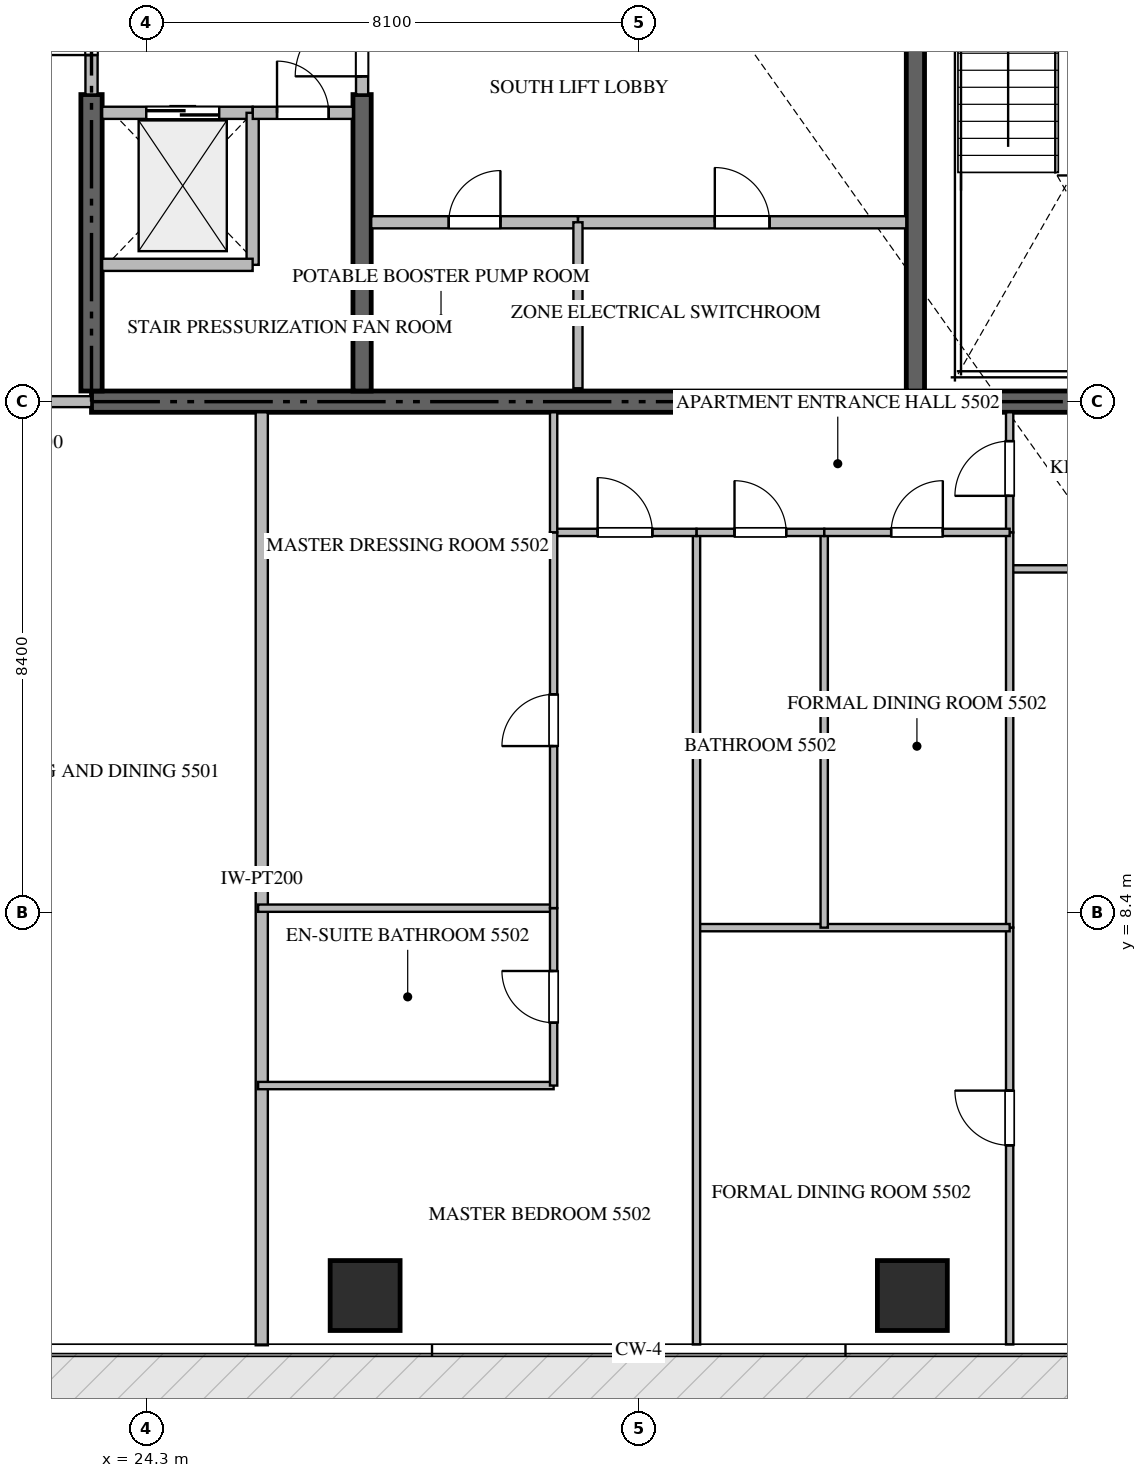
"""IFC4 building model, lengths in metres.
Left out: names, types, materials, properties, quantities, classifications, styles, units other than length and angle.
Written with IfcOpenShell. Run it as: python <this file> out.ifc"""

import sys

from ifc_helpers import new_model, si_unit, direction, frame, frame_2d, origin, origin_2d, place, context, subcontext, project, spatial, rectangle, extrude, source, transform, mapped, element, fill, save


model = new_model("IFC4")
c1 = context("Model", 3, precision=1e-05, world=origin(), true_north=direction((0.0, 1.0)))
c2 = subcontext(c1, "Body", "Model", "MODEL_VIEW")
j1 = project(units=[si_unit("LENGTHUNIT", "METRE"), si_unit("PLANEANGLEUNIT", "RADIAN")], contexts=[c1])
p1 = place(None, origin())
s1 = spatial("IfcSite", under=j1, at=p1, CompositionType="ELEMENT")
p2 = place(p1, origin())
s2 = spatial("IfcBuilding", under=s1, at=p2, CompositionType="ELEMENT")
p3 = place(p2, frame((0.0, 0.0, 222.0)))
s3 = spatial("IfcBuildingStorey", under=s2, at=p3, CompositionType="ELEMENT", Elevation=222.0)
p4 = place(p3, frame((23.4, 16.8, -0.26), z_axis=(0.0, 0.0, 1.0), x_axis=(1.0, 0.0, 0.0)))
e1 = element("IfcWall", 1, at=p4, inside=s3, PredefinedType="SHEAR", context=c2, shape_type="SweptSolid", body=[
    extrude(rectangle(XDim=18.0, YDim=0.35, at=frame_2d((9.0, 0.0))), origin(), (0.0, 0.0, 1.0), 3.848),
])
p5 = place(p3, frame((23.4, 16.975, -0.26), z_axis=(0.0, 0.0, 1.0), x_axis=(0.0, 1.0, 0.0)))
e2 = element("IfcWall", 2, at=p5, inside=s3, PredefinedType="SHEAR", context=c2, shape_type="SweptSolid", body=[
    extrude(rectangle(XDim=4.875, YDim=0.35, at=frame_2d((2.438, 0.0))), origin(), (0.0, 0.0, 1.0), 3.848),
])
p6 = place(p3, frame((27.85, 16.975, -0.26), z_axis=(0.0, 0.0, 1.0), x_axis=(0.0, 1.0, 0.0)))
e3 = element("IfcWall", 3, at=p6, inside=s3, PredefinedType="SHEAR", context=c2, shape_type="SweptSolid", body=[
    extrude(rectangle(XDim=4.875, YDim=0.3, at=frame_2d((2.438, 0.0))), origin(), (0.0, 0.0, 1.0), 3.848),
])
p7 = place(p3, frame((36.95, 16.975, -0.26), z_axis=(0.0, 0.0, 1.0), x_axis=(0.0, 1.0, 0.0)))
e4 = element("IfcWall", 4, at=p7, inside=s3, PredefinedType="SHEAR", context=c2, shape_type="SweptSolid", body=[
    extrude(rectangle(XDim=8.375, YDim=0.3, at=frame_2d((4.188, 0.0))), origin(), (0.0, 0.0, 1.0), 3.848),
])
m1 = source(origin(), c2, "Body", "SweptSolid", [
    extrude(rectangle(XDim=1.15, YDim=1.15, at=origin_2d()), origin(), (0.0, 0.0, 1.0), 3.85),
])
for number, where, z_axis, x_axis in (
    (5, (27.9, 2.1, -0.26), (0.0, 0.0, 1.0), (1.0, 0.0, 0.0)),
    (6, (36.9, 2.1, -0.26), (0.0, 0.0, 1.0), (1.0, 0.0, 0.0)),
):
    element("IfcColumn", number, at=place(p3, frame(where, z_axis=z_axis, x_axis=x_axis)), inside=s3, PredefinedType="COLUMN", context=c2, shape_type="MappedRepresentation", body=[
        mapped(m1, transform((0.0, 0.0, 0.0), scale=1.0)),
    ])
p8 = place(p3, frame((23.575, 21.55, 0.0), z_axis=(0.0, 0.0, 1.0), x_axis=(1.0, 0.0, 0.0)))
e7 = element("IfcWall", 7, at=p8, inside=s3, PredefinedType="STANDARD", context=c2, shape_type="SweptSolid", body=[
    extrude(rectangle(XDim=2.475, YDim=0.2, at=frame_2d((1.238, 0.0))), origin(), (0.0, 0.0, 1.0), 3.59),
])
p9 = place(p8, frame((0.725, 0.0, 0.0)))
e8 = element("IfcOpeningElement", 8, at=p9, cuts=e7, PredefinedType="OPENING", context=c2, shape_type="SweptSolid", body=[
    extrude(rectangle(XDim=1.2, YDim=2.2, at=frame_2d((0.6, 1.1))), frame((0.0, 0.11, 0.0), z_axis=(0.0, -1.0, 0.0), x_axis=(1.0, 0.0, 0.0)), (0.0, 0.0, 1.0), 0.22),
])
p10 = place(p3, frame((26.05, 19.05, 0.0), z_axis=(0.0, 0.0, 1.0), x_axis=(0.0, 1.0, 0.0)))
e9 = element("IfcWall", 9, at=p10, inside=s3, PredefinedType="STANDARD", context=c2, shape_type="SweptSolid", body=[
    extrude(rectangle(XDim=2.5, YDim=0.2, at=frame_2d((1.25, 0.0))), origin(), (0.0, 0.0, 1.0), 3.59),
])
p11 = place(p3, frame((23.575, 19.05, 0.0), z_axis=(0.0, 0.0, 1.0), x_axis=(1.0, 0.0, 0.0)))
e10 = element("IfcWall", 10, at=p11, inside=s3, PredefinedType="STANDARD", context=c2, shape_type="SweptSolid", body=[
    extrude(rectangle(XDim=2.475, YDim=0.2, at=frame_2d((1.238, 0.0))), origin(), (0.0, 0.0, 1.0), 3.59),
])
p12 = place(p3, frame((26.052, 21.55, 0.0), z_axis=(0.0, 0.0, 1.0), x_axis=(1.0, 0.0, 0.0)))
e11 = element("IfcWall", 11, at=p12, inside=s3, PredefinedType="STANDARD", context=c2, shape_type="SweptSolid", body=[
    extrude(rectangle(XDim=1.648, YDim=0.2, at=frame_2d((0.824, 0.0))), origin(), (0.0, 0.0, 1.0), 3.59),
])
p13 = place(p12, frame((0.399, 0.0, 0.0)))
e12 = element("IfcOpeningElement", 12, at=p13, cuts=e11, PredefinedType="OPENING", context=c2, shape_type="SweptSolid", body=[
    extrude(rectangle(XDim=0.85, YDim=2.1, at=frame_2d((0.425, 1.05))), frame((0.0, 0.11, 0.0), z_axis=(0.0, -1.0, 0.0), x_axis=(1.0, 0.0, 0.0)), (0.0, 0.0, 1.0), 0.22),
])
p14 = place(p3, frame((23.4, 21.852, 0.0), z_axis=(0.0, 0.0, 1.0), x_axis=(0.0, 1.0, 0.0)))
e13 = element("IfcWall", 13, at=p14, inside=s3, PredefinedType="STANDARD", context=c2, shape_type="SweptSolid", body=[
    extrude(rectangle(XDim=2.396, YDim=0.2, at=frame_2d((1.198, 0.0))), origin(), (0.0, 0.0, 1.0), 3.59),
])
p15 = place(p14, frame((0.648, 0.0, 0.0)))
e14 = element("IfcOpeningElement", 14, at=p15, cuts=e13, PredefinedType="OPENING", context=c2, shape_type="SweptSolid", body=[
    extrude(rectangle(XDim=1.1, YDim=2.15, at=frame_2d((0.55, 1.075))), frame((0.0, 0.11, 0.0), z_axis=(0.0, -1.0, 0.0), x_axis=(1.0, 0.0, 0.0)), (0.0, 0.0, 1.0), 0.22),
])
p16 = place(p3, frame((27.85, 21.852, 0.0), z_axis=(0.0, 0.0, 1.0), x_axis=(0.0, 1.0, 0.0)))
e15 = element("IfcWall", 15, at=p16, inside=s3, PredefinedType="STANDARD", context=c2, shape_type="SweptSolid", body=[
    extrude(rectangle(XDim=1.696, YDim=0.2, at=frame_2d((0.848, 0.0))), origin(), (0.0, 0.0, 1.0), 3.59),
])
p17 = place(p16, frame((0.298, 0.0, 0.0)))
e16 = element("IfcOpeningElement", 16, at=p17, cuts=e15, PredefinedType="OPENING", context=c2, shape_type="SweptSolid", body=[
    extrude(rectangle(XDim=1.1, YDim=2.15, at=frame_2d((0.55, 1.075))), frame((0.0, 0.11, 0.0), z_axis=(0.0, -1.0, 0.0), x_axis=(1.0, 0.0, 0.0)), (0.0, 0.0, 1.0), 0.22),
])
p18 = place(p3, frame((28.0, 19.75, 0.0), z_axis=(0.0, 0.0, 1.0), x_axis=(1.0, 0.0, 0.0)))
e17 = element("IfcWall", 17, at=p18, inside=s3, PredefinedType="STANDARD", context=c2, shape_type="SweptSolid", body=[
    extrude(rectangle(XDim=3.4, YDim=0.2, at=frame_2d((1.7, 0.0))), origin(), (0.0, 0.0, 1.0), 3.59),
])
p19 = place(p18, frame((1.275, 0.0, 0.0)))
e18 = element("IfcOpeningElement", 18, at=p19, cuts=e17, PredefinedType="OPENING", context=c2, shape_type="SweptSolid", body=[
    extrude(rectangle(XDim=0.85, YDim=2.1, at=frame_2d((0.425, 1.05))), frame((0.0, 0.11, 0.0), z_axis=(0.0, -1.0, 0.0), x_axis=(1.0, 0.0, 0.0)), (0.0, 0.0, 1.0), 0.22),
])
p20 = place(p3, frame((31.402, 19.75, 0.0), z_axis=(0.0, 0.0, 1.0), x_axis=(1.0, 0.0, 0.0)))
e19 = element("IfcWall", 19, at=p20, inside=s3, PredefinedType="STANDARD", context=c2, shape_type="SweptSolid", body=[
    extrude(rectangle(XDim=5.398, YDim=0.2, at=frame_2d((2.699, 0.0))), origin(), (0.0, 0.0, 1.0), 3.59),
])
p21 = place(p20, frame((2.249, 0.0, 0.0)))
e20 = element("IfcOpeningElement", 20, at=p21, cuts=e19, PredefinedType="OPENING", context=c2, shape_type="SweptSolid", body=[
    extrude(rectangle(XDim=0.9, YDim=2.1, at=frame_2d((0.45, 1.05))), frame((0.0, 0.11, 0.0), z_axis=(0.0, -1.0, 0.0), x_axis=(1.0, 0.0, 0.0)), (0.0, 0.0, 1.0), 0.22),
])
p22 = place(p3, frame((31.4, 17.02, 0.0), z_axis=(0.0, 0.0, 1.0), x_axis=(0.0, 1.0, 0.0)))
e21 = element("IfcWall", 21, at=p22, inside=s3, PredefinedType="PARTITIONING", context=c2, shape_type="SweptSolid", body=[
    extrude(rectangle(XDim=2.73, YDim=0.15, at=frame_2d((1.365, 0.0))), origin(), (0.0, 0.0, 1.0), 3.59),
])
p23 = place(p3, frame((26.2, 1.282, 0.0), z_axis=(0.0, 0.0, 1.0), x_axis=(0.0, 1.0, 0.0)))
e22 = element("IfcWall", 22, at=p23, inside=s3, PredefinedType="PARTITIONING", context=c2, shape_type="SweptSolid", body=[
    extrude(rectangle(XDim=15.343, YDim=0.2, at=frame_2d((7.671, 0.0))), origin(), (0.0, 0.0, 1.0), 3.59),
])
p24 = place(p3, frame((20.902, 16.8, 0.0), z_axis=(0.0, 0.0, 1.0), x_axis=(1.0, 0.0, 0.0)))
e23 = element("IfcWall", 23, at=p24, inside=s3, PredefinedType="PARTITIONING", context=c2, shape_type="SweptSolid", body=[
    extrude(rectangle(XDim=2.496, YDim=0.18, at=frame_2d((1.248, 0.0))), origin(), (0.0, 0.0, 1.0), 3.59),
])
p25 = place(p24, frame((0.748, 0.0, 0.0)))
e24 = element("IfcOpeningElement", 24, at=p25, cuts=e23, PredefinedType="OPENING", context=c2, shape_type="SweptSolid", body=[
    extrude(rectangle(XDim=1.0, YDim=2.15, at=frame_2d((0.5, 1.075))), frame((0.0, 0.1, 0.0), z_axis=(0.0, -1.0, 0.0), x_axis=(1.0, 0.0, 0.0)), (0.0, 0.0, 1.0), 0.2),
])
p26 = place(p3, frame((38.5, 14.05, 0.0), z_axis=(0.0, 0.0, 1.0), x_axis=(1.0, 0.0, 0.0)))
e25 = element("IfcWall", 25, at=p26, inside=s3, PredefinedType="PARTITIONING", context=c2, shape_type="SweptSolid", body=[
    extrude(rectangle(XDim=2.85, YDim=0.12, at=frame_2d((1.425, 0.0))), origin(), (0.0, 0.0, 1.0), 3.59),
])
p27 = place(p26, frame((1.0, 0.0, 0.0)))
e26 = element("IfcOpeningElement", 26, at=p27, cuts=e25, PredefinedType="OPENING", context=c2, shape_type="SweptSolid", body=[
    extrude(rectangle(XDim=0.85, YDim=2.1, at=frame_2d((0.425, 1.05))), frame((0.0, 0.07, 0.0), z_axis=(0.0, -1.0, 0.0), x_axis=(1.0, 0.0, 0.0)), (0.0, 0.0, 1.0), 0.14),
])
p28 = place(p3, frame((38.5, 14.65, 0.0), z_axis=(0.0, 0.0, 1.0), x_axis=(0.0, 1.0, 0.0)))
e27 = element("IfcWall", 27, at=p28, inside=s3, PredefinedType="PARTITIONING", context=c2, shape_type="SweptSolid", body=[
    extrude(rectangle(XDim=1.975, YDim=0.12, at=frame_2d((0.988, 0.0))), origin(), (0.0, 0.0, 1.0), 3.59),
])
p29 = place(p28, frame((0.601, 0.0, 0.0)))
e28 = element("IfcOpeningElement", 28, at=p29, cuts=e27, PredefinedType="OPENING", context=c2, shape_type="SweptSolid", body=[
    extrude(rectangle(XDim=0.9, YDim=2.1, at=frame_2d((0.45, 1.05))), frame((0.0, 0.07, 0.0), z_axis=(0.0, -1.0, 0.0), x_axis=(1.0, 0.0, 0.0)), (0.0, 0.0, 1.0), 0.14),
])
p30 = place(p3, frame((38.5, 1.295, 0.0), z_axis=(0.0, 0.0, 1.0), x_axis=(0.0, 1.0, 0.0)))
e29 = element("IfcWall", 29, at=p30, inside=s3, PredefinedType="PARTITIONING", context=c2, shape_type="SweptSolid", body=[
    extrude(rectangle(XDim=6.855, YDim=0.12, at=frame_2d((3.427, 0.0))), origin(), (0.0, 0.0, 1.0), 3.59),
])
p31 = place(p30, frame((3.275, 0.0, 0.0)))
e30 = element("IfcOpeningElement", 30, at=p31, cuts=e29, PredefinedType="OPENING", context=c2, shape_type="SweptSolid", body=[
    extrude(rectangle(XDim=0.9, YDim=2.1, at=frame_2d((0.45, 1.05))), frame((0.0, 0.07, 0.0), z_axis=(0.0, -1.0, 0.0), x_axis=(1.0, 0.0, 0.0)), (0.0, 0.0, 1.0), 0.14),
])
p32 = place(p3, frame((38.5, 8.152, 0.0), z_axis=(0.0, 0.0, 1.0), x_axis=(0.0, 1.0, 0.0)))
e31 = element("IfcWall", 31, at=p32, inside=s3, PredefinedType="PARTITIONING", context=c2, shape_type="SweptSolid", body=[
    extrude(rectangle(XDim=6.496, YDim=0.12, at=frame_2d((3.248, 0.0))), origin(), (0.0, 0.0, 1.0), 3.59),
])
p33 = place(p3, frame((33.35, 8.15, 0.0), z_axis=(0.0, 0.0, 1.0), x_axis=(1.0, 0.0, 0.0)))
e32 = element("IfcWall", 32, at=p33, inside=s3, PredefinedType="PARTITIONING", context=c2, shape_type="SweptSolid", body=[
    extrude(rectangle(XDim=5.15, YDim=0.12, at=frame_2d((2.575, 0.0))), origin(), (0.0, 0.0, 1.0), 3.59),
])
p34 = place(p3, frame((33.35, 1.295, 0.0), z_axis=(0.0, 0.0, 1.0), x_axis=(0.0, 1.0, 0.0)))
e33 = element("IfcWall", 33, at=p34, inside=s3, PredefinedType="PARTITIONING", context=c2, shape_type="SweptSolid", body=[
    extrude(rectangle(XDim=13.355, YDim=0.12, at=frame_2d((6.677, 0.0))), origin(), (0.0, 0.0, 1.0), 3.59),
])
p35 = place(p3, frame((35.45, 8.15, 0.0), z_axis=(0.0, 0.0, 1.0), x_axis=(0.0, 1.0, 0.0)))
e34 = element("IfcWall", 34, at=p35, inside=s3, PredefinedType="PARTITIONING", context=c2, shape_type="SweptSolid", body=[
    extrude(rectangle(XDim=6.5, YDim=0.12, at=frame_2d((3.25, 0.0))), origin(), (0.0, 0.0, 1.0), 3.59),
])
p36 = place(p3, frame((33.35, 14.65, 0.0), z_axis=(0.0, 0.0, 1.0), x_axis=(1.0, 0.0, 0.0)))
e35 = element("IfcWall", 35, at=p36, inside=s3, PredefinedType="PARTITIONING", context=c2, shape_type="SweptSolid", body=[
    extrude(rectangle(XDim=2.1, YDim=0.12, at=frame_2d((1.05, 0.0))), origin(), (0.0, 0.0, 1.0), 3.59),
])
p37 = place(p36, frame((0.625, 0.0, 0.0)))
e36 = element("IfcOpeningElement", 36, at=p37, cuts=e35, PredefinedType="OPENING", context=c2, shape_type="SweptSolid", body=[
    extrude(rectangle(XDim=0.85, YDim=2.1, at=frame_2d((0.425, 1.05))), frame((0.0, 0.07, 0.0), z_axis=(0.0, -1.0, 0.0), x_axis=(1.0, 0.0, 0.0)), (0.0, 0.0, 1.0), 0.14),
])
p38 = place(p3, frame((35.452, 14.65, 0.0), z_axis=(0.0, 0.0, 1.0), x_axis=(1.0, 0.0, 0.0)))
e37 = element("IfcWall", 37, at=p38, inside=s3, PredefinedType="PARTITIONING", context=c2, shape_type="SweptSolid", body=[
    extrude(rectangle(XDim=3.048, YDim=0.12, at=frame_2d((1.524, 0.0))), origin(), (0.0, 0.0, 1.0), 3.59),
])
p39 = place(p38, frame((1.099, 0.0, 0.0)))
e38 = element("IfcOpeningElement", 38, at=p39, cuts=e37, PredefinedType="OPENING", context=c2, shape_type="SweptSolid", body=[
    extrude(rectangle(XDim=0.85, YDim=2.1, at=frame_2d((0.425, 1.05))), frame((0.0, 0.07, 0.0), z_axis=(0.0, -1.0, 0.0), x_axis=(1.0, 0.0, 0.0)), (0.0, 0.0, 1.0), 0.14),
])
p40 = place(p3, frame((31.0, 14.65, 0.0), z_axis=(0.0, 0.0, 1.0), x_axis=(1.0, 0.0, 0.0)))
e39 = element("IfcWall", 39, at=p40, inside=s3, PredefinedType="PARTITIONING", context=c2, shape_type="SweptSolid", body=[
    extrude(rectangle(XDim=2.348, YDim=0.12, at=frame_2d((1.174, 0.0))), origin(), (0.0, 0.0, 1.0), 3.59),
])
p41 = place(p40, frame((0.724, 0.0, 0.0)))
e40 = element("IfcOpeningElement", 40, at=p41, cuts=e39, PredefinedType="OPENING", context=c2, shape_type="SweptSolid", body=[
    extrude(rectangle(XDim=0.9, YDim=2.1, at=frame_2d((0.45, 1.05))), frame((0.0, 0.07, 0.0), z_axis=(0.0, -1.0, 0.0), x_axis=(1.0, 0.0, 0.0)), (0.0, 0.0, 1.0), 0.14),
])
for number, where, z_axis, x_axis in (
    (41, (26.14, 5.553, 0.0), (0.0, 0.0, 1.0), (1.0, 0.0, 0.0)),
    (42, (26.14, 8.47, 0.0), (0.0, 0.0, 1.0), (1.0, 0.0, 0.0)),
):
    element("IfcWall", number, at=place(p3, frame(where, z_axis=z_axis, x_axis=x_axis)), inside=s3, PredefinedType="PARTITIONING", context=c2, shape_type="SweptSolid", body=[
        extrude(rectangle(XDim=4.86, YDim=0.12, at=frame_2d((2.43, 0.0))), origin(), (0.0, 0.0, 1.0), 3.59),
    ])
p42 = place(p3, frame((31.0, 5.553, 0.0), z_axis=(0.0, 0.0, 1.0), x_axis=(0.0, 1.0, 0.0)))
e43 = element("IfcWall", 43, at=p42, inside=s3, PredefinedType="PARTITIONING", context=c2, shape_type="SweptSolid", body=[
    extrude(rectangle(XDim=2.917, YDim=0.12, at=frame_2d((1.458, 0.0))), origin(), (0.0, 0.0, 1.0), 3.59),
])
p43 = place(p42, frame((1.034, 0.0, 0.0)))
e44 = element("IfcOpeningElement", 44, at=p43, cuts=e43, PredefinedType="OPENING", context=c2, shape_type="SweptSolid", body=[
    extrude(rectangle(XDim=0.85, YDim=2.1, at=frame_2d((0.425, 1.05))), frame((0.0, 0.07, 0.0), z_axis=(0.0, -1.0, 0.0), x_axis=(1.0, 0.0, 0.0)), (0.0, 0.0, 1.0), 0.14),
])
p44 = place(p3, frame((31.0, 8.472, 0.0), z_axis=(0.0, 0.0, 1.0), x_axis=(0.0, 1.0, 0.0)))
e45 = element("IfcWall", 45, at=p44, inside=s3, PredefinedType="PARTITIONING", context=c2, shape_type="SweptSolid", body=[
    extrude(rectangle(XDim=6.178, YDim=0.12, at=frame_2d((3.089, 0.0))), origin(), (0.0, 0.0, 1.0), 3.59),
])
p45 = place(p44, frame((2.664, 0.0, 0.0)))
e46 = element("IfcOpeningElement", 46, at=p45, cuts=e45, PredefinedType="OPENING", context=c2, shape_type="SweptSolid", body=[
    extrude(rectangle(XDim=0.85, YDim=2.1, at=frame_2d((0.425, 1.05))), frame((0.0, 0.07, 0.0), z_axis=(0.0, -1.0, 0.0), x_axis=(1.0, 0.0, 0.0)), (0.0, 0.0, 1.0), 0.14),
])
p46 = place(p3, frame((31.0, 14.652, 0.0), z_axis=(0.0, 0.0, 1.0), x_axis=(0.0, 1.0, 0.0)))
e47 = element("IfcWall", 47, at=p46, inside=s3, PredefinedType="PARTITIONING", context=c2, shape_type="SweptSolid", body=[
    extrude(rectangle(XDim=1.973, YDim=0.12, at=frame_2d((0.986, 0.0))), origin(), (0.0, 0.0, 1.0), 3.59),
])
m2 = source(origin(), c2, "Body", "SweptSolid", [
    extrude(rectangle(XDim=1.2, YDim=2.2, at=frame_2d((0.6, 1.1))), frame((0.0, 0.025, 0.0), z_axis=(0.0, -1.0, 0.0), x_axis=(1.0, 0.0, 0.0)), (0.0, 0.0, 1.0), 0.05),
])
p47 = place(p9, origin())
e48 = element("IfcDoor", 48, at=p47, inside=s3, OperationType="DOUBLE_DOOR_SLIDING", PredefinedType="DOOR", context=c2, shape_type="MappedRepresentation", body=[
    mapped(m2, transform((0.0, 0.0, 0.0), scale=1.0)),
])
fill(e8, e48)
m3 = source(origin(), c2, "Body", "SweptSolid", [
    extrude(rectangle(XDim=0.85, YDim=2.1, at=frame_2d((0.425, 1.05))), frame((0.0, 0.025, 0.0), z_axis=(0.0, -1.0, 0.0), x_axis=(1.0, 0.0, 0.0)), (0.0, 0.0, 1.0), 0.05),
])
p48 = place(p13, origin())
e49 = element("IfcDoor", 49, at=p48, inside=s3, OperationType="SINGLE_SWING_LEFT", PredefinedType="DOOR", context=c2, shape_type="MappedRepresentation", body=[
    mapped(m3, transform((0.0, 0.0, 0.0), scale=1.0)),
])
fill(e12, e49)
m4 = source(origin(), c2, "Body", "SweptSolid", [
    extrude(rectangle(XDim=1.1, YDim=2.15, at=frame_2d((0.55, 1.075))), frame((0.0, 0.025, 0.0), z_axis=(0.0, -1.0, 0.0), x_axis=(1.0, 0.0, 0.0)), (0.0, 0.0, 1.0), 0.05),
])
p49 = place(p15, origin())
e50 = element("IfcDoor", 50, at=p49, inside=s3, OperationType="SINGLE_SWING_LEFT", PredefinedType="DOOR", context=c2, shape_type="MappedRepresentation", body=[
    mapped(m4, transform((0.0, 0.0, 0.0), scale=1.0)),
])
fill(e14, e50)
p50 = place(p17, origin())
e51 = element("IfcDoor", 51, at=p50, inside=s3, OperationType="SINGLE_SWING_LEFT", PredefinedType="DOOR", context=c2, shape_type="MappedRepresentation", body=[
    mapped(m4, transform((0.0, 0.0, 0.0), scale=1.0)),
])
fill(e16, e51)
p51 = place(p19, origin())
e52 = element("IfcDoor", 52, at=p51, inside=s3, OperationType="SINGLE_SWING_RIGHT", PredefinedType="DOOR", context=c2, shape_type="MappedRepresentation", body=[
    mapped(m3, transform((0.0, 0.0, 0.0), scale=1.0)),
])
fill(e18, e52)
m5 = source(origin(), c2, "Body", "SweptSolid", [
    extrude(rectangle(XDim=0.9, YDim=2.1, at=frame_2d((0.45, 1.05))), frame((0.0, 0.025, 0.0), z_axis=(0.0, -1.0, 0.0), x_axis=(1.0, 0.0, 0.0)), (0.0, 0.0, 1.0), 0.05),
])
p52 = place(p21, origin())
e53 = element("IfcDoor", 53, at=p52, inside=s3, OperationType="SINGLE_SWING_LEFT", PredefinedType="DOOR", context=c2, shape_type="MappedRepresentation", body=[
    mapped(m5, transform((0.0, 0.0, 0.0), scale=1.0)),
])
fill(e20, e53)
p53 = place(p29, origin())
e54 = element("IfcDoor", 54, at=p53, inside=s3, OperationType="SINGLE_SWING_LEFT", PredefinedType="DOOR", context=c2, shape_type="MappedRepresentation", body=[
    mapped(m5, transform((0.0, 0.0, 0.0), scale=1.0)),
])
fill(e28, e54)
p54 = place(p31, origin())
e55 = element("IfcDoor", 55, at=p54, inside=s3, OperationType="SINGLE_SWING_RIGHT", PredefinedType="DOOR", context=c2, shape_type="MappedRepresentation", body=[
    mapped(m5, transform((0.0, 0.0, 0.0), scale=1.0)),
])
fill(e30, e55)
p55 = place(p37, origin())
e56 = element("IfcDoor", 56, at=p55, inside=s3, OperationType="SINGLE_SWING_LEFT", PredefinedType="DOOR", context=c2, shape_type="MappedRepresentation", body=[
    mapped(m3, transform((0.0, 0.0, 0.0), scale=1.0)),
])
fill(e36, e56)
p56 = place(p39, origin())
e57 = element("IfcDoor", 57, at=p56, inside=s3, OperationType="SINGLE_SWING_RIGHT", PredefinedType="DOOR", context=c2, shape_type="MappedRepresentation", body=[
    mapped(m3, transform((0.0, 0.0, 0.0), scale=1.0)),
])
fill(e38, e57)
p57 = place(p41, origin())
e58 = element("IfcDoor", 58, at=p57, inside=s3, OperationType="SINGLE_SWING_LEFT", PredefinedType="DOOR", context=c2, shape_type="MappedRepresentation", body=[
    mapped(m5, transform((0.0, 0.0, 0.0), scale=1.0)),
])
fill(e40, e58)
p58 = place(p43, origin())
e59 = element("IfcDoor", 59, at=p58, inside=s3, OperationType="SINGLE_SWING_RIGHT", PredefinedType="DOOR", context=c2, shape_type="MappedRepresentation", body=[
    mapped(m3, transform((0.0, 0.0, 0.0), scale=1.0)),
])
fill(e44, e59)
p59 = place(p45, origin())
e60 = element("IfcDoor", 60, at=p59, inside=s3, OperationType="SINGLE_SWING_LEFT", PredefinedType="DOOR", context=c2, shape_type="MappedRepresentation", body=[
    mapped(m3, transform((0.0, 0.0, 0.0), scale=1.0)),
])
fill(e46, e60)
save(model, sys.argv[1])
